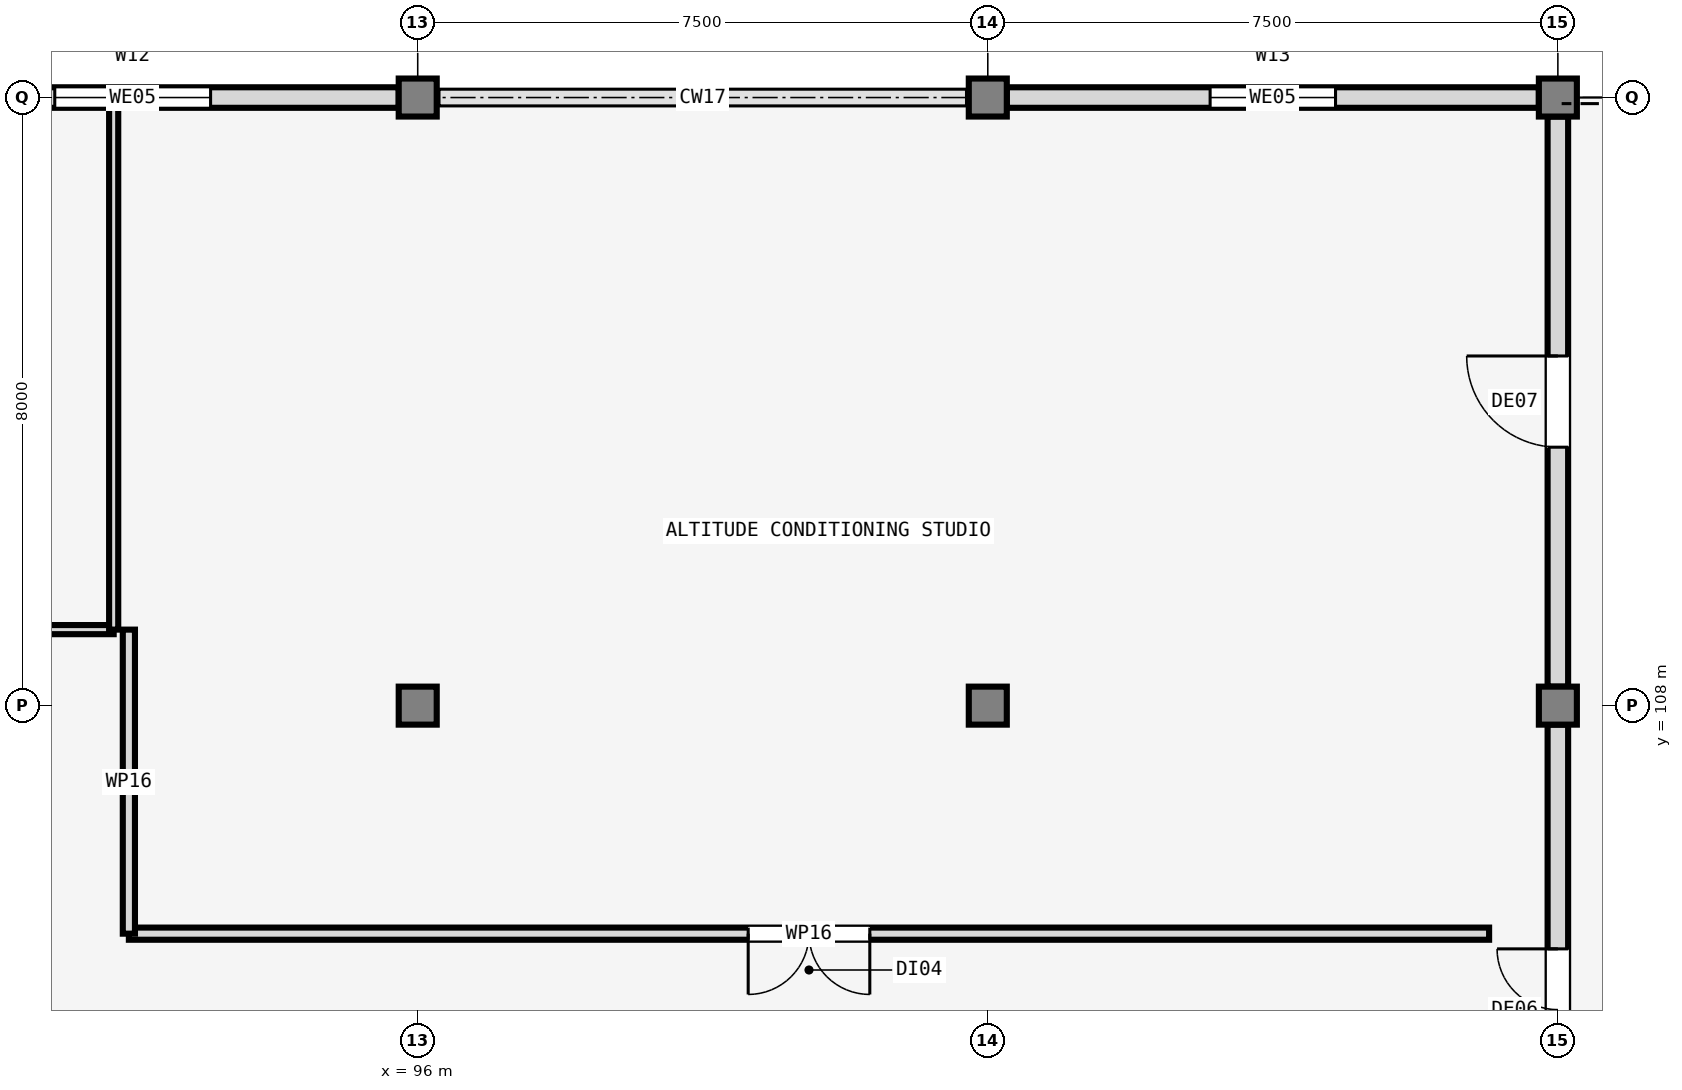
"""IFC4 building model, lengths in metres.
Left out: names, types, materials, properties, quantities, classifications, styles, units other than length and angle.
Written with IfcOpenShell. Run it as: python <this file> out.ifc"""

import sys

from ifc_helpers import new_model, si_unit, direction, frame, frame_2d, origin, origin_2d, place, context, subcontext, project, spatial, rectangle, extrude, element, fill, save


model = new_model("IFC4")
c1 = context("Model", 3, precision=1e-05, world=origin(), true_north=direction((0.0, 1.0)))
c2 = subcontext(c1, "Body", "Model", "MODEL_VIEW")
j1 = project(units=[si_unit("LENGTHUNIT", "METRE"), si_unit("PLANEANGLEUNIT", "RADIAN")], contexts=[c1])
p1 = place(None, origin())
s1 = spatial("IfcSite", under=j1, at=p1, CompositionType="ELEMENT")
p2 = place(p1, origin())
s2 = spatial("IfcBuilding", under=s1, at=p2, CompositionType="ELEMENT")
p3 = place(p2, frame((0.0, 0.0, 13.5)))
s3 = spatial("IfcBuildingStorey", under=s2, at=p3, CompositionType="ELEMENT", Elevation=13.5)
for number, where, z_axis, x_axis in (
    (1, (96.0, 108.0, 0.0), (0.0, 0.0, 1.0), (1.0, 0.0, 0.0)),
    (2, (96.0, 116.0, 0.0), (0.0, 0.0, 1.0), (1.0, 0.0, 0.0)),
    (3, (103.5, 108.0, 0.0), (0.0, 0.0, 1.0), (1.0, 0.0, 0.0)),
    (4, (103.5, 116.0, 0.0), (0.0, 0.0, 1.0), (1.0, 0.0, 0.0)),
    (5, (111.0, 108.0, 0.0), (0.0, 0.0, 1.0), (1.0, 0.0, 0.0)),
    (6, (111.0, 116.0, 0.0), (0.0, 0.0, 1.0), (1.0, 0.0, 0.0)),
):
    element("IfcColumn", number, at=place(p3, frame(where, z_axis=z_axis, x_axis=x_axis)), inside=s3, PredefinedType="COLUMN", context=c2, shape_type="SweptSolid", body=[
        extrude(rectangle(XDim=0.5, YDim=0.5, at=origin_2d()), origin(), (0.0, 0.0, 1.0), 4.2),
    ])
p4 = place(p3, frame((95.75, 116.0, 0.0), z_axis=(0.0, 0.0, 1.0), x_axis=(-1.0, 0.0, 0.0)))
e7 = element("IfcWall", 7, at=p4, inside=s3, PredefinedType="SOLIDWALL", context=c2, shape_type="SweptSolid", body=[
    extrude(rectangle(XDim=7.0, YDim=0.27, at=frame_2d((3.5, 0.0))), origin(), (0.0, 0.0, 1.0), 3.43),
])
p5 = place(p4, frame((2.475, 0.0, 0.95)))
e8 = element("IfcOpeningElement", 8, at=p5, cuts=e7, PredefinedType="OPENING", context=c2, shape_type="SweptSolid", body=[
    extrude(rectangle(XDim=2.05, YDim=1.4, at=frame_2d((1.025, 0.7))), frame((0.0, 0.145, 0.0), z_axis=(0.0, -1.0, 0.0), x_axis=(1.0, 0.0, 0.0)), (0.0, 0.0, 1.0), 0.29),
])
p6 = place(p3, frame((110.75, 116.0, 0.0), z_axis=(0.0, 0.0, 1.0), x_axis=(-1.0, 0.0, 0.0)))
e9 = element("IfcWall", 9, at=p6, inside=s3, PredefinedType="SOLIDWALL", context=c2, shape_type="SweptSolid", body=[
    extrude(rectangle(XDim=7.0, YDim=0.27, at=frame_2d((3.5, 0.0))), origin(), (0.0, 0.0, 1.0), 3.43),
])
p7 = place(p6, frame((2.675, 0.0, 0.95)))
e10 = element("IfcOpeningElement", 10, at=p7, cuts=e9, PredefinedType="OPENING", context=c2, shape_type="SweptSolid", body=[
    extrude(rectangle(XDim=1.65, YDim=1.35, at=frame_2d((0.825, 0.675))), frame((0.0, 0.145, 0.0), z_axis=(0.0, -1.0, 0.0), x_axis=(1.0, 0.0, 0.0)), (0.0, 0.0, 1.0), 0.29),
])
p8 = place(p3, frame((111.0, 100.25, 0.0), z_axis=(0.0, 0.0, 1.0), x_axis=(0.0, 1.0, 0.0)))
e11 = element("IfcWall", 11, at=p8, inside=s3, PredefinedType="SOLIDWALL", context=c2, shape_type="SweptSolid", body=[
    extrude(rectangle(XDim=7.5, YDim=0.27, at=frame_2d((3.75, 0.0))), origin(), (0.0, 0.0, 1.0), 3.43),
])
p9 = place(p8, frame((2.95, 0.0, 0.0)))
e12 = element("IfcOpeningElement", 12, at=p9, cuts=e11, PredefinedType="OPENING", context=c2, shape_type="SweptSolid", body=[
    extrude(rectangle(XDim=1.6, YDim=2.2, at=frame_2d((0.8, 1.1))), frame((0.0, 0.145, 0.0), z_axis=(0.0, -1.0, 0.0), x_axis=(1.0, 0.0, 0.0)), (0.0, 0.0, 1.0), 0.29),
])
p10 = place(p3, frame((111.0, 108.25, 0.0), z_axis=(0.0, 0.0, 1.0), x_axis=(0.0, 1.0, 0.0)))
e13 = element("IfcWall", 13, at=p10, inside=s3, PredefinedType="SOLIDWALL", context=c2, shape_type="SweptSolid", body=[
    extrude(rectangle(XDim=7.5, YDim=0.27, at=frame_2d((3.75, 0.0))), origin(), (0.0, 0.0, 1.0), 3.43),
])
p11 = place(p10, frame((3.15, 0.0, 0.0)))
e14 = element("IfcOpeningElement", 14, at=p11, cuts=e13, PredefinedType="OPENING", context=c2, shape_type="SweptSolid", body=[
    extrude(rectangle(XDim=1.2, YDim=2.15, at=frame_2d((0.6, 1.075))), frame((0.0, 0.145, 0.0), z_axis=(0.0, -1.0, 0.0), x_axis=(1.0, 0.0, 0.0)), (0.0, 0.0, 1.0), 0.29),
])
p12 = place(p3, frame((92.0, 109.0, 0.0), z_axis=(0.0, 0.0, 1.0), x_axis=(-1.0, 0.0, 0.0)))
e15 = element("IfcWall", 15, at=p12, inside=s3, PredefinedType="PARTITIONING", context=c2, shape_type="SweptSolid", body=[
    extrude(rectangle(XDim=4.2, YDim=0.12, at=frame_2d((2.1, 0.0))), origin(), (0.0, 0.0, 1.0), 3.12),
])
p13 = place(p12, frame((1.6, 0.0, 0.0)))
e16 = element("IfcOpeningElement", 16, at=p13, cuts=e15, PredefinedType="OPENING", context=c2, shape_type="SweptSolid", body=[
    extrude(rectangle(XDim=1.0, YDim=2.1, at=frame_2d((0.5, 1.05))), frame((0.0, 0.07, 0.0), z_axis=(0.0, -1.0, 0.0), x_axis=(1.0, 0.0, 0.0)), (0.0, 0.0, 1.0), 0.14),
])
p14 = place(p3, frame((92.0, 115.885, 0.0), z_axis=(0.0, 0.0, 1.0), x_axis=(0.0, -1.0, 0.0)))
e17 = element("IfcWall", 17, at=p14, inside=s3, PredefinedType="PARTITIONING", context=c2, shape_type="SweptSolid", body=[
    extrude(rectangle(XDim=6.885, YDim=0.12, at=frame_2d((3.442, 0.0))), origin(), (0.0, 0.0, 1.0), 3.12),
])
p15 = place(p3, frame((110.095, 105.0, 0.0), z_axis=(0.0, 0.0, 1.0), x_axis=(-1.0, 0.0, 0.0)))
e18 = element("IfcWall", 18, at=p15, inside=s3, PredefinedType="PARTITIONING", context=c2, shape_type="SweptSolid", body=[
    extrude(rectangle(XDim=17.896, YDim=0.16, at=frame_2d((8.948, 0.0))), origin(), (0.0, 0.0, 1.0), 3.12),
])
p16 = place(p15, frame((8.148, 0.0, 0.0)))
e19 = element("IfcOpeningElement", 19, at=p16, cuts=e18, PredefinedType="OPENING", context=c2, shape_type="SweptSolid", body=[
    extrude(rectangle(XDim=1.6, YDim=2.2, at=frame_2d((0.8, 1.1))), frame((0.0, 0.09, 0.0), z_axis=(0.0, -1.0, 0.0), x_axis=(1.0, 0.0, 0.0)), (0.0, 0.0, 1.0), 0.18),
])
p17 = place(p3, frame((92.2, 105.0, 0.0), z_axis=(0.0, 0.0, 1.0), x_axis=(0.0, 1.0, 0.0)))
e20 = element("IfcWall", 20, at=p17, inside=s3, PredefinedType="PARTITIONING", context=c2, shape_type="SweptSolid", body=[
    extrude(rectangle(XDim=4.0, YDim=0.16, at=frame_2d((2.0, 0.0))), origin(), (0.0, 0.0, 1.0), 3.12),
])
p18 = place(p5, origin())
e21 = element("IfcWindow", 21, at=p18, inside=s3, PartitioningType="SINGLE_PANEL", PredefinedType="WINDOW", context=c2, shape_type="SweptSolid", body=[
    extrude(rectangle(XDim=2.05, YDim=1.4, at=frame_2d((1.025, 0.7))), frame((0.0, 0.03, 0.0), z_axis=(0.0, -1.0, 0.0), x_axis=(1.0, 0.0, 0.0)), (0.0, 0.0, 1.0), 0.06),
])
fill(e8, e21)
p19 = place(p7, origin())
e22 = element("IfcWindow", 22, at=p19, inside=s3, PartitioningType="SINGLE_PANEL", PredefinedType="WINDOW", context=c2, shape_type="SweptSolid", body=[
    extrude(rectangle(XDim=1.65, YDim=1.35, at=frame_2d((0.825, 0.675))), frame((0.0, 0.03, 0.0), z_axis=(0.0, -1.0, 0.0), x_axis=(1.0, 0.0, 0.0)), (0.0, 0.0, 1.0), 0.06),
])
fill(e10, e22)
p20 = place(p9, frame((1.6, 0.0, 0.0), z_axis=(0.0, 0.0, 1.0), x_axis=(-1.0, 0.0, 0.0)))
e23 = element("IfcDoor", 23, at=p20, inside=s3, OperationType="DOUBLE_DOOR_SINGLE_SWING", PredefinedType="DOOR", context=c2, shape_type="SweptSolid", body=[
    extrude(rectangle(XDim=1.6, YDim=2.2, at=frame_2d((0.8, 1.1))), frame((0.0, 0.025, 0.0), z_axis=(0.0, -1.0, 0.0), x_axis=(1.0, 0.0, 0.0)), (0.0, 0.0, 1.0), 0.05),
])
fill(e12, e23)
p21 = place(p11, frame((1.2, 0.0, 0.0), z_axis=(0.0, 0.0, 1.0), x_axis=(-1.0, 0.0, 0.0)))
e24 = element("IfcDoor", 24, at=p21, inside=s3, OperationType="SINGLE_SWING_RIGHT", PredefinedType="DOOR", context=c2, shape_type="SweptSolid", body=[
    extrude(rectangle(XDim=1.2, YDim=2.15, at=frame_2d((0.6, 1.075))), frame((0.0, 0.025, 0.0), z_axis=(0.0, -1.0, 0.0), x_axis=(1.0, 0.0, 0.0)), (0.0, 0.0, 1.0), 0.05),
])
fill(e14, e24)
p22 = place(p16, origin())
e25 = element("IfcDoor", 25, at=p22, inside=s3, OperationType="DOUBLE_DOOR_SINGLE_SWING", PredefinedType="DOOR", context=c2, shape_type="SweptSolid", body=[
    extrude(rectangle(XDim=1.6, YDim=2.2, at=frame_2d((0.8, 1.1))), frame((0.0, 0.025, 0.0), z_axis=(0.0, -1.0, 0.0), x_axis=(1.0, 0.0, 0.0)), (0.0, 0.0, 1.0), 0.05),
])
fill(e19, e25)
save(model, sys.argv[1])
